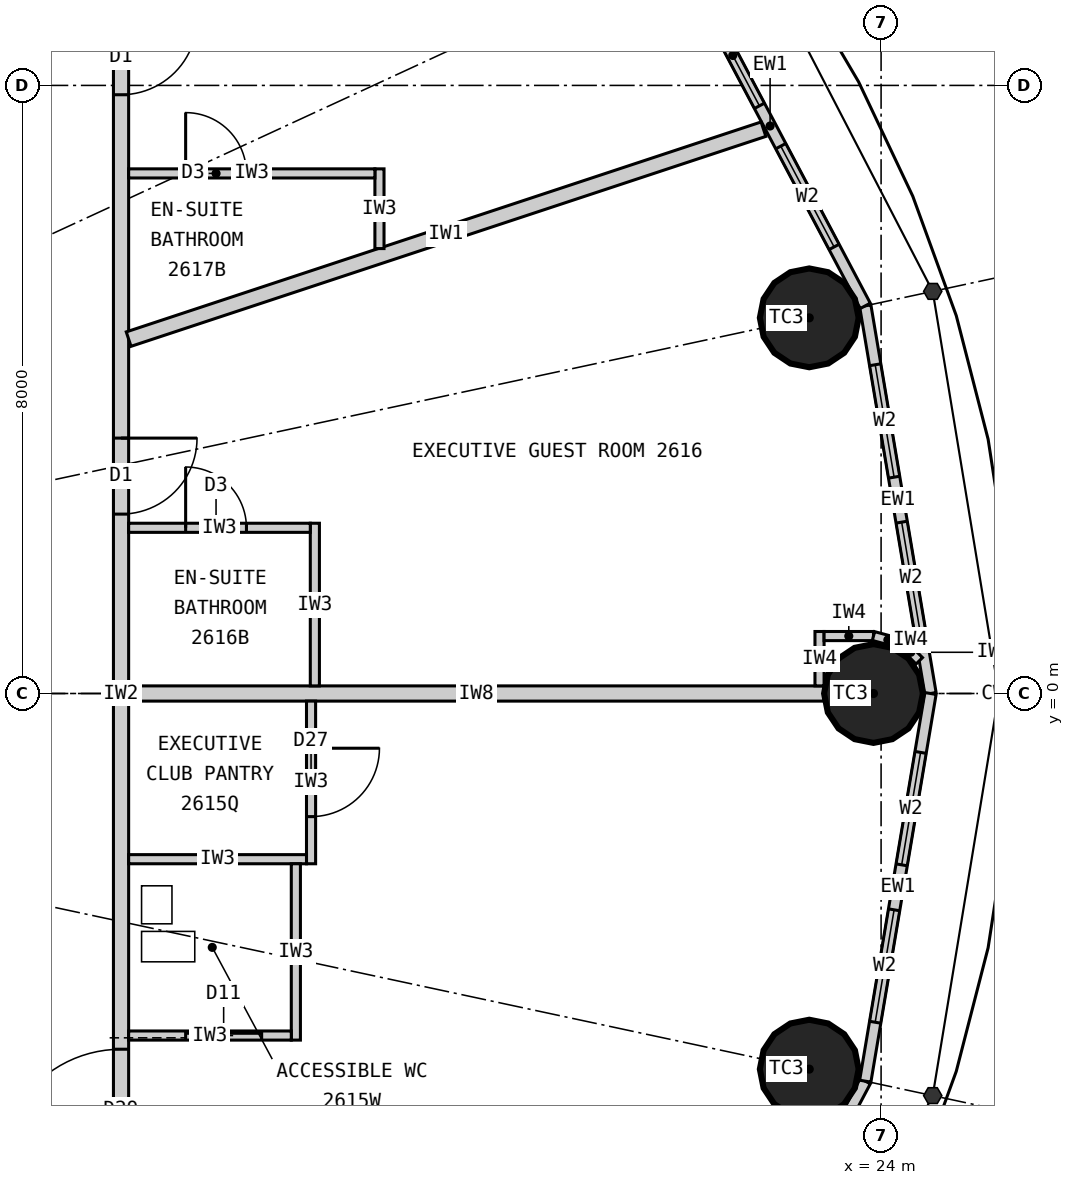
"""IFC4 building model, lengths in metres.
Left out: names, types, materials, properties, quantities, classifications, styles, units other than length and angle.
Written with IfcOpenShell. Run it as: python <this file> out.ifc"""

import sys

from ifc_helpers import new_model, si_unit, direction, frame, frame_2d, origin, origin_2d, place, context, subcontext, project, spatial, rectangle, circle, extrude, element, fill, save


model = new_model("IFC4")
c1 = context("Model", 3, precision=1e-05, world=origin(), true_north=direction((0.0, 1.0)))
c2 = subcontext(c1, "Body", "Model", "MODEL_VIEW")
j1 = project(units=[si_unit("LENGTHUNIT", "METRE"), si_unit("PLANEANGLEUNIT", "RADIAN")], contexts=[c1])
p1 = place(None, origin())
s1 = spatial("IfcSite", under=j1, at=p1, CompositionType="ELEMENT")
p2 = place(p1, origin())
s2 = spatial("IfcBuilding", under=s1, at=p2, CompositionType="ELEMENT")
p3 = place(p2, frame((0.0, 0.0, 105.6)))
s3 = spatial("IfcBuildingStorey", under=s2, at=p3, CompositionType="ELEMENT", Elevation=105.6)
for number, where, z_axis, x_axis in (
    (1, (23.9, 0.0, 0.0), (0.0, 0.0, 1.0), (1.0, 0.0, 0.0)),
    (2, (23.055, 4.942, 0.0), (0.0, 0.0, 1.0), (1.0, 0.0, 0.0)),
    (3, (23.055, -4.942, 0.0), (0.0, 0.0, 1.0), (1.0, 0.0, 0.0)),
):
    element("IfcColumn", number, at=place(p3, frame(where, z_axis=z_axis, x_axis=x_axis)), inside=s3, PredefinedType="COLUMN", context=c2, shape_type="SweptSolid", body=[
        extrude(circle(Radius=0.65, at=origin_2d()), origin(), (0.0, 0.0, 1.0), 3.3),
    ])
p4 = place(p3, frame((24.65, 0.0, 0.0), z_axis=(0.0, 0.0, 1.0), x_axis=(-0.165883894218, 0.986145290329, 0.0)))
e4 = element("IfcWall", 4, at=p4, inside=s3, PredefinedType="ELEMENTEDWALL", context=c2, shape_type="SweptSolid", body=[
    extrude(rectangle(XDim=5.172, YDim=0.15, at=frame_2d((2.586, 0.0))), origin(), (0.0, 0.0, 1.0), 3.12),
])
p5 = place(p4, frame((0.786, 0.0, 0.9)))
e5 = element("IfcOpeningElement", 5, at=p5, cuts=e4, PredefinedType="OPENING", context=c2, shape_type="SweptSolid", body=[
    extrude(rectangle(XDim=1.5, YDim=1.9, at=frame_2d((0.75, 0.95))), frame((0.0, 0.085, 0.0), z_axis=(0.0, -1.0, 0.0), x_axis=(1.0, 0.0, 0.0)), (0.0, 0.0, 1.0), 0.17),
])
p6 = place(p4, frame((2.886, 0.0, 0.9)))
e6 = element("IfcOpeningElement", 6, at=p6, cuts=e4, PredefinedType="OPENING", context=c2, shape_type="SweptSolid", body=[
    extrude(rectangle(XDim=1.5, YDim=1.9, at=frame_2d((0.75, 0.95))), frame((0.0, 0.085, 0.0), z_axis=(0.0, -1.0, 0.0), x_axis=(1.0, 0.0, 0.0)), (0.0, 0.0, 1.0), 0.17),
])
p7 = place(p3, frame((23.792, 5.1, 0.0), z_axis=(0.0, 0.0, 1.0), x_axis=(-0.467814388454, 0.883826735257, 0.0)))
e7 = element("IfcWall", 7, at=p7, inside=s3, PredefinedType="ELEMENTEDWALL", context=c2, shape_type="SweptSolid", body=[
    extrude(rectangle(XDim=5.354, YDim=0.15, at=frame_2d((2.677, 0.0))), origin(), (0.0, 0.0, 1.0), 3.12),
])
p8 = place(p7, frame((0.877, 0.0, 0.9)))
e8 = element("IfcOpeningElement", 8, at=p8, cuts=e7, PredefinedType="OPENING", context=c2, shape_type="SweptSolid", body=[
    extrude(rectangle(XDim=1.5, YDim=1.9, at=frame_2d((0.75, 0.95))), frame((0.0, 0.085, 0.0), z_axis=(0.0, -1.0, 0.0), x_axis=(1.0, 0.0, 0.0)), (0.0, 0.0, 1.0), 0.17),
])
p9 = place(p7, frame((2.977, 0.0, 0.9)))
e9 = element("IfcOpeningElement", 9, at=p9, cuts=e7, PredefinedType="OPENING", context=c2, shape_type="SweptSolid", body=[
    extrude(rectangle(XDim=1.5, YDim=1.9, at=frame_2d((0.75, 0.95))), frame((0.0, 0.085, 0.0), z_axis=(0.0, -1.0, 0.0), x_axis=(1.0, 0.0, 0.0)), (0.0, 0.0, 1.0), 0.17),
])
p10 = place(p3, frame((21.287, -9.832, 0.0), z_axis=(0.0, 0.0, 1.0), x_axis=(0.467814388454, 0.883826735257, 0.0)))
e10 = element("IfcWall", 10, at=p10, inside=s3, PredefinedType="ELEMENTEDWALL", context=c2, shape_type="SweptSolid", body=[
    extrude(rectangle(XDim=5.354, YDim=0.15, at=frame_2d((2.677, 0.0))), origin(), (0.0, 0.0, 1.0), 3.12),
])
p11 = place(p10, frame((0.877, 0.0, 0.9)))
e11 = element("IfcOpeningElement", 11, at=p11, cuts=e10, PredefinedType="OPENING", context=c2, shape_type="SweptSolid", body=[
    extrude(rectangle(XDim=1.5, YDim=1.9, at=frame_2d((0.75, 0.95))), frame((0.0, 0.085, 0.0), z_axis=(0.0, -1.0, 0.0), x_axis=(1.0, 0.0, 0.0)), (0.0, 0.0, 1.0), 0.17),
])
p12 = place(p10, frame((2.977, 0.0, 0.9)))
e12 = element("IfcOpeningElement", 12, at=p12, cuts=e10, PredefinedType="OPENING", context=c2, shape_type="SweptSolid", body=[
    extrude(rectangle(XDim=1.5, YDim=1.9, at=frame_2d((0.75, 0.95))), frame((0.0, 0.085, 0.0), z_axis=(0.0, -1.0, 0.0), x_axis=(1.0, 0.0, 0.0)), (0.0, 0.0, 1.0), 0.17),
])
p13 = place(p3, frame((23.792, -5.1, 0.0), z_axis=(0.0, 0.0, 1.0), x_axis=(0.165883894218, 0.986145290329, 0.0)))
e13 = element("IfcWall", 13, at=p13, inside=s3, PredefinedType="ELEMENTEDWALL", context=c2, shape_type="SweptSolid", body=[
    extrude(rectangle(XDim=5.172, YDim=0.15, at=frame_2d((2.586, 0.0))), origin(), (0.0, 0.0, 1.0), 3.12),
])
p14 = place(p13, frame((0.786, 0.0, 0.9)))
e14 = element("IfcOpeningElement", 14, at=p14, cuts=e13, PredefinedType="OPENING", context=c2, shape_type="SweptSolid", body=[
    extrude(rectangle(XDim=1.5, YDim=1.9, at=frame_2d((0.75, 0.95))), frame((0.0, 0.085, 0.0), z_axis=(0.0, -1.0, 0.0), x_axis=(1.0, 0.0, 0.0)), (0.0, 0.0, 1.0), 0.17),
])
p15 = place(p13, frame((2.886, 0.0, 0.9)))
e15 = element("IfcOpeningElement", 15, at=p15, cuts=e13, PredefinedType="OPENING", context=c2, shape_type="SweptSolid", body=[
    extrude(rectangle(XDim=1.5, YDim=1.9, at=frame_2d((0.75, 0.95))), frame((0.0, 0.085, 0.0), z_axis=(0.0, -1.0, 0.0), x_axis=(1.0, 0.0, 0.0)), (0.0, 0.0, 1.0), 0.17),
])
p16 = place(p3, frame((14.0, -9.9, 0.0), z_axis=(0.0, 0.0, 1.0), x_axis=(0.0, 1.0, 0.0)))
e16 = element("IfcWall", 16, at=p16, inside=s3, PredefinedType="PARTITIONING", context=c2, shape_type="SweptSolid", body=[
    extrude(rectangle(XDim=19.8, YDim=0.2, at=frame_2d((9.9, 0.0))), origin(), (0.0, 0.0, 1.0), 3.12),
])
p17 = place(p16, frame((3.62, 0.0, 0.0)))
e17 = element("IfcOpeningElement", 17, at=p17, cuts=e16, PredefinedType="OPENING", context=c2, shape_type="SweptSolid", body=[
    extrude(rectangle(XDim=1.6, YDim=2.4, at=frame_2d((0.8, 1.2))), frame((0.0, 0.11, 0.0), z_axis=(0.0, -1.0, 0.0), x_axis=(1.0, 0.0, 0.0)), (0.0, 0.0, 1.0), 0.22),
])
p18 = place(p16, frame((12.26, 0.0, 0.0)))
e18 = element("IfcOpeningElement", 18, at=p18, cuts=e16, PredefinedType="OPENING", context=c2, shape_type="SweptSolid", body=[
    extrude(rectangle(XDim=1.0, YDim=2.2, at=frame_2d((0.5, 1.1))), frame((0.0, 0.11, 0.0), z_axis=(0.0, -1.0, 0.0), x_axis=(1.0, 0.0, 0.0)), (0.0, 0.0, 1.0), 0.22),
])
p19 = place(p16, frame((17.777, 0.0, 0.0)))
e19 = element("IfcOpeningElement", 19, at=p19, cuts=e16, PredefinedType="OPENING", context=c2, shape_type="SweptSolid", body=[
    extrude(rectangle(XDim=1.0, YDim=2.2, at=frame_2d((0.5, 1.1))), frame((0.0, 0.11, 0.0), z_axis=(0.0, -1.0, 0.0), x_axis=(1.0, 0.0, 0.0)), (0.0, 0.0, 1.0), 0.22),
])
p20 = place(p3, frame((14.1, 0.0, 0.0), z_axis=(0.0, 0.0, 1.0), x_axis=(1.0, 0.0, 0.0)))
e20 = element("IfcWall", 20, at=p20, inside=s3, PredefinedType="PARTITIONING", context=c2, shape_type="SweptSolid", body=[
    extrude(rectangle(XDim=9.15, YDim=0.2, at=frame_2d((4.575, 0.0))), origin(), (0.0, 0.0, 1.0), 2.27),
])
p21 = place(p3, frame((14.1, 4.662, 0.0), z_axis=(0.0, 0.0, 1.0), x_axis=(0.949446466373, 0.313928984789, 0.0)))
e21 = element("IfcWall", 21, at=p21, inside=s3, PredefinedType="PARTITIONING", context=c2, shape_type="SweptSolid", body=[
    extrude(rectangle(XDim=8.797, YDim=0.2, at=frame_2d((4.399, 0.0))), origin(), (0.0, 0.0, 1.0), 3.12),
])
p22 = place(p3, frame((16.5, -0.1, 0.0), z_axis=(0.0, 0.0, 1.0), x_axis=(0.0, -1.0, 0.0)))
e22 = element("IfcWall", 22, at=p22, inside=s3, PredefinedType="PARTITIONING", context=c2, shape_type="SweptSolid", body=[
    extrude(rectangle(XDim=2.14, YDim=0.12, at=frame_2d((1.07, 0.0))), origin(), (0.0, 0.0, 1.0), 3.12),
])
p23 = place(p22, frame((0.62, 0.0, 0.0)))
e23 = element("IfcOpeningElement", 23, at=p23, cuts=e22, PredefinedType="OPENING", context=c2, shape_type="SweptSolid", body=[
    extrude(rectangle(XDim=0.9, YDim=2.1, at=frame_2d((0.45, 1.05))), frame((0.0, 0.07, 0.0), z_axis=(0.0, -1.0, 0.0), x_axis=(1.0, 0.0, 0.0)), (0.0, 0.0, 1.0), 0.14),
])
p24 = place(p3, frame((14.1, -2.18, 0.0), z_axis=(0.0, 0.0, 1.0), x_axis=(1.0, 0.0, 0.0)))
e24 = element("IfcWall", 24, at=p24, inside=s3, PredefinedType="PARTITIONING", context=c2, shape_type="SweptSolid", body=[
    extrude(rectangle(XDim=2.34, YDim=0.12, at=frame_2d((1.17, 0.0))), origin(), (0.0, 0.0, 1.0), 3.12),
])
p25 = place(p3, frame((16.3, -2.24, 0.0), z_axis=(0.0, 0.0, 1.0), x_axis=(0.0, -1.0, 0.0)))
e25 = element("IfcWall", 25, at=p25, inside=s3, PredefinedType="PARTITIONING", context=c2, shape_type="SweptSolid", body=[
    extrude(rectangle(XDim=2.32, YDim=0.12, at=frame_2d((1.16, 0.0))), origin(), (0.0, 0.0, 1.0), 3.12),
])
p26 = place(p3, frame((14.1, -4.5, 0.0), z_axis=(0.0, 0.0, 1.0), x_axis=(1.0, 0.0, 0.0)))
e26 = element("IfcWall", 26, at=p26, inside=s3, PredefinedType="PARTITIONING", context=c2, shape_type="SweptSolid", body=[
    extrude(rectangle(XDim=2.14, YDim=0.12, at=frame_2d((1.07, 0.0))), origin(), (0.0, 0.0, 1.0), 3.12),
])
p27 = place(p26, frame((0.75, 0.0, 0.0)))
e27 = element("IfcOpeningElement", 27, at=p27, cuts=e26, PredefinedType="OPENING", context=c2, shape_type="SweptSolid", body=[
    extrude(rectangle(XDim=1.0, YDim=2.2, at=frame_2d((0.5, 1.1))), frame((0.0, 0.07, 0.0), z_axis=(0.0, -1.0, 0.0), x_axis=(1.0, 0.0, 0.0)), (0.0, 0.0, 1.0), 0.14),
])
p28 = place(p3, frame((16.55, 0.1, 0.0), z_axis=(0.0, 0.0, 1.0), x_axis=(0.0, 1.0, 0.0)))
e28 = element("IfcWall", 28, at=p28, inside=s3, PredefinedType="PARTITIONING", context=c2, shape_type="SweptSolid", body=[
    extrude(rectangle(XDim=2.14, YDim=0.12, at=frame_2d((1.07, 0.0))), origin(), (0.0, 0.0, 1.0), 3.12),
])
p29 = place(p3, frame((14.1, 2.18, 0.0), z_axis=(0.0, 0.0, 1.0), x_axis=(1.0, 0.0, 0.0)))
e29 = element("IfcWall", 29, at=p29, inside=s3, PredefinedType="PARTITIONING", context=c2, shape_type="SweptSolid", body=[
    extrude(rectangle(XDim=2.39, YDim=0.12, at=frame_2d((1.195, 0.0))), origin(), (0.0, 0.0, 1.0), 3.12),
])
p30 = place(p29, frame((0.75, 0.0, 0.0)))
e30 = element("IfcOpeningElement", 30, at=p30, cuts=e29, PredefinedType="OPENING", context=c2, shape_type="SweptSolid", body=[
    extrude(rectangle(XDim=0.8, YDim=2.1, at=frame_2d((0.4, 1.05))), frame((0.0, 0.07, 0.0), z_axis=(0.0, -1.0, 0.0), x_axis=(1.0, 0.0, 0.0)), (0.0, 0.0, 1.0), 0.14),
])
p31 = place(p3, frame((17.4, 5.854, 0.0), z_axis=(0.0, 0.0, 1.0), x_axis=(0.0, 1.0, 0.0)))
e31 = element("IfcWall", 31, at=p31, inside=s3, PredefinedType="PARTITIONING", context=c2, shape_type="SweptSolid", body=[
    extrude(rectangle(XDim=1.049, YDim=0.12, at=frame_2d((0.524, 0.0))), origin(), (0.0, 0.0, 1.0), 3.12),
])
p32 = place(p3, frame((14.1, 6.842, 0.0), z_axis=(0.0, 0.0, 1.0), x_axis=(1.0, 0.0, 0.0)))
e32 = element("IfcWall", 32, at=p32, inside=s3, PredefinedType="PARTITIONING", context=c2, shape_type="SweptSolid", body=[
    extrude(rectangle(XDim=3.24, YDim=0.12, at=frame_2d((1.62, 0.0))), origin(), (0.0, 0.0, 1.0), 3.12),
])
p33 = place(p32, frame((0.75, 0.0, 0.0)))
e33 = element("IfcOpeningElement", 33, at=p33, cuts=e32, PredefinedType="OPENING", context=c2, shape_type="SweptSolid", body=[
    extrude(rectangle(XDim=0.8, YDim=2.1, at=frame_2d((0.4, 1.05))), frame((0.0, 0.07, 0.0), z_axis=(0.0, -1.0, 0.0), x_axis=(1.0, 0.0, 0.0)), (0.0, 0.0, 1.0), 0.14),
])
p34 = place(p3, frame((23.19, 0.1, 0.0), z_axis=(0.0, 0.0, 1.0), x_axis=(0.0, 1.0, 0.0)))
e34 = element("IfcWall", 34, at=p34, inside=s3, PredefinedType="PARTITIONING", context=c2, shape_type="SweptSolid", body=[
    extrude(rectangle(XDim=0.716, YDim=0.12, at=frame_2d((0.358, 0.0))), origin(), (0.0, 0.0, 1.0), 3.12),
])
p35 = place(p3, frame((23.25, 0.756, 0.0), z_axis=(0.0, 0.0, 1.0), x_axis=(1.0, 0.0, 0.0)))
e35 = element("IfcWall", 35, at=p35, inside=s3, PredefinedType="PARTITIONING", context=c2, shape_type="SweptSolid", body=[
    extrude(rectangle(XDim=0.65, YDim=0.12, at=frame_2d((0.325, 0.0))), origin(), (0.0, 0.0, 1.0), 3.12),
])
p36 = place(p3, frame((23.9, 0.756, 0.0), z_axis=(0.0, 0.0, 1.0), x_axis=(0.965892334856, -0.2589440045, 0.0)))
e36 = element("IfcWall", 36, at=p36, inside=s3, PredefinedType="PARTITIONING", context=c2, shape_type="SweptSolid", body=[
    extrude(rectangle(XDim=0.391, YDim=0.12, at=frame_2d((0.196, 0.0))), origin(), (0.0, 0.0, 1.0), 3.12),
])
p37 = place(p3, frame((24.278, 0.655, 0.0), z_axis=(0.0, 0.0, 1.0), x_axis=(0.707106781187, -0.707106781187, 0.0)))
e37 = element("IfcWall", 37, at=p37, inside=s3, PredefinedType="PARTITIONING", context=c2, shape_type="SweptSolid", body=[
    extrude(rectangle(XDim=0.318, YDim=0.12, at=frame_2d((0.159, 0.0))), origin(), (0.0, 0.0, 1.0), 3.12),
])
p38 = place(p5, origin())
e38 = element("IfcWindow", 38, at=p38, inside=s3, PartitioningType="SINGLE_PANEL", PredefinedType="WINDOW", context=c2, shape_type="SweptSolid", body=[
    extrude(rectangle(XDim=1.5, YDim=1.9, at=frame_2d((0.75, 0.95))), frame((0.0, 0.03, 0.0), z_axis=(0.0, -1.0, 0.0), x_axis=(1.0, 0.0, 0.0)), (0.0, 0.0, 1.0), 0.06),
])
fill(e5, e38)
p39 = place(p6, origin())
e39 = element("IfcWindow", 39, at=p39, inside=s3, PartitioningType="SINGLE_PANEL", PredefinedType="WINDOW", context=c2, shape_type="SweptSolid", body=[
    extrude(rectangle(XDim=1.5, YDim=1.9, at=frame_2d((0.75, 0.95))), frame((0.0, 0.03, 0.0), z_axis=(0.0, -1.0, 0.0), x_axis=(1.0, 0.0, 0.0)), (0.0, 0.0, 1.0), 0.06),
])
fill(e6, e39)
p40 = place(p8, origin())
e40 = element("IfcWindow", 40, at=p40, inside=s3, PartitioningType="SINGLE_PANEL", PredefinedType="WINDOW", context=c2, shape_type="SweptSolid", body=[
    extrude(rectangle(XDim=1.5, YDim=1.9, at=frame_2d((0.75, 0.95))), frame((0.0, 0.03, 0.0), z_axis=(0.0, -1.0, 0.0), x_axis=(1.0, 0.0, 0.0)), (0.0, 0.0, 1.0), 0.06),
])
fill(e8, e40)
p41 = place(p9, origin())
e41 = element("IfcWindow", 41, at=p41, inside=s3, PartitioningType="SINGLE_PANEL", PredefinedType="WINDOW", context=c2, shape_type="SweptSolid", body=[
    extrude(rectangle(XDim=1.5, YDim=1.9, at=frame_2d((0.75, 0.95))), frame((0.0, 0.03, 0.0), z_axis=(0.0, -1.0, 0.0), x_axis=(1.0, 0.0, 0.0)), (0.0, 0.0, 1.0), 0.06),
])
fill(e9, e41)
p42 = place(p14, origin())
e42 = element("IfcWindow", 42, at=p42, inside=s3, PartitioningType="SINGLE_PANEL", PredefinedType="WINDOW", context=c2, shape_type="SweptSolid", body=[
    extrude(rectangle(XDim=1.5, YDim=1.9, at=frame_2d((0.75, 0.95))), frame((0.0, 0.03, 0.0), z_axis=(0.0, -1.0, 0.0), x_axis=(1.0, 0.0, 0.0)), (0.0, 0.0, 1.0), 0.06),
])
fill(e14, e42)
p43 = place(p15, origin())
e43 = element("IfcWindow", 43, at=p43, inside=s3, PartitioningType="SINGLE_PANEL", PredefinedType="WINDOW", context=c2, shape_type="SweptSolid", body=[
    extrude(rectangle(XDim=1.5, YDim=1.9, at=frame_2d((0.75, 0.95))), frame((0.0, 0.03, 0.0), z_axis=(0.0, -1.0, 0.0), x_axis=(1.0, 0.0, 0.0)), (0.0, 0.0, 1.0), 0.06),
])
fill(e15, e43)
p44 = place(p23, origin())
e44 = element("IfcDoor", 44, at=p44, inside=s3, OperationType="SINGLE_SWING_LEFT", PredefinedType="DOOR", context=c2, shape_type="SweptSolid", body=[
    extrude(rectangle(XDim=0.9, YDim=2.1, at=frame_2d((0.45, 1.05))), frame((0.0, 0.025, 0.0), z_axis=(0.0, -1.0, 0.0), x_axis=(1.0, 0.0, 0.0)), (0.0, 0.0, 1.0), 0.05),
])
fill(e23, e44)
p45 = place(p27, origin())
e45 = element("IfcDoor", 45, at=p45, inside=s3, OperationType="SLIDING_TO_LEFT", PredefinedType="DOOR", context=c2, shape_type="SweptSolid", body=[
    extrude(rectangle(XDim=1.0, YDim=2.2, at=frame_2d((0.5, 1.1))), frame((0.0, 0.025, 0.0), z_axis=(0.0, -1.0, 0.0), x_axis=(1.0, 0.0, 0.0)), (0.0, 0.0, 1.0), 0.05),
])
fill(e27, e45)
p46 = place(p17, origin())
e46 = element("IfcDoor", 46, at=p46, inside=s3, OperationType="DOUBLE_DOOR_DOUBLE_SWING", PredefinedType="DOOR", context=c2, shape_type="SweptSolid", body=[
    extrude(rectangle(XDim=1.6, YDim=2.4, at=frame_2d((0.8, 1.2))), frame((0.0, 0.025, 0.0), z_axis=(0.0, -1.0, 0.0), x_axis=(1.0, 0.0, 0.0)), (0.0, 0.0, 1.0), 0.05),
])
fill(e17, e46)
p47 = place(p30, origin())
e47 = element("IfcDoor", 47, at=p47, inside=s3, OperationType="SINGLE_SWING_LEFT", PredefinedType="DOOR", context=c2, shape_type="SweptSolid", body=[
    extrude(rectangle(XDim=0.8, YDim=2.1, at=frame_2d((0.4, 1.05))), frame((0.0, 0.025, 0.0), z_axis=(0.0, -1.0, 0.0), x_axis=(1.0, 0.0, 0.0)), (0.0, 0.0, 1.0), 0.05),
])
fill(e30, e47)
p48 = place(p18, origin())
e48 = element("IfcDoor", 48, at=p48, inside=s3, OperationType="SINGLE_SWING_RIGHT", PredefinedType="DOOR", context=c2, shape_type="SweptSolid", body=[
    extrude(rectangle(XDim=1.0, YDim=2.2, at=frame_2d((0.5, 1.1))), frame((0.0, 0.025, 0.0), z_axis=(0.0, -1.0, 0.0), x_axis=(1.0, 0.0, 0.0)), (0.0, 0.0, 1.0), 0.05),
])
fill(e18, e48)
p49 = place(p33, origin())
e49 = element("IfcDoor", 49, at=p49, inside=s3, OperationType="SINGLE_SWING_LEFT", PredefinedType="DOOR", context=c2, shape_type="SweptSolid", body=[
    extrude(rectangle(XDim=0.8, YDim=2.1, at=frame_2d((0.4, 1.05))), frame((0.0, 0.025, 0.0), z_axis=(0.0, -1.0, 0.0), x_axis=(1.0, 0.0, 0.0)), (0.0, 0.0, 1.0), 0.05),
])
fill(e33, e49)
p50 = place(p19, origin())
e50 = element("IfcDoor", 50, at=p50, inside=s3, OperationType="SINGLE_SWING_RIGHT", PredefinedType="DOOR", context=c2, shape_type="SweptSolid", body=[
    extrude(rectangle(XDim=1.0, YDim=2.2, at=frame_2d((0.5, 1.1))), frame((0.0, 0.025, 0.0), z_axis=(0.0, -1.0, 0.0), x_axis=(1.0, 0.0, 0.0)), (0.0, 0.0, 1.0), 0.05),
])
fill(e19, e50)
save(model, sys.argv[1])
